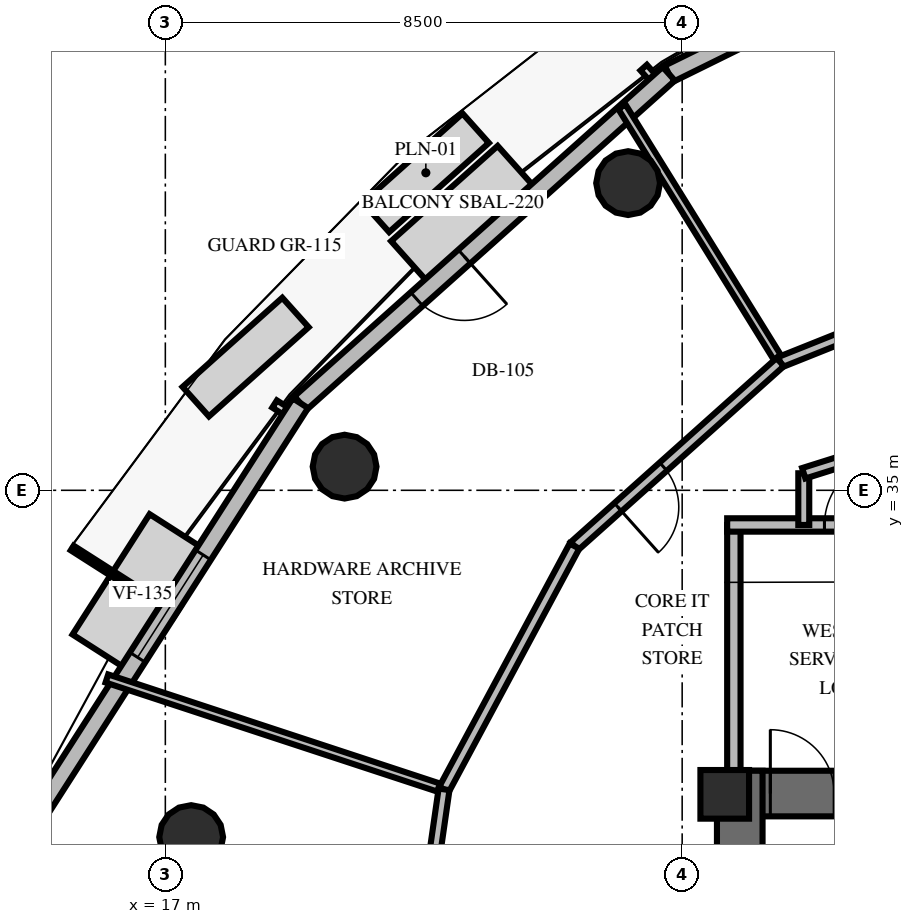
"""IFC4 building model, lengths in metres.
Left out: names, types, materials, properties, quantities, classifications, styles, units other than length and angle.
Written with IfcOpenShell. Run it as: python <this file> out.ifc"""

import sys

from ifc_helpers import new_model, si_unit, direction, frame, frame_2d, origin, origin_2d, place, context, subcontext, project, spatial, rectangle, circle, extrude, element, fill, save


model = new_model("IFC4")
c1 = context("Model", 3, precision=1e-05, world=origin(), true_north=direction((0.0, 1.0)))
c2 = subcontext(c1, "Body", "Model", "MODEL_VIEW")
j1 = project(units=[si_unit("LENGTHUNIT", "METRE"), si_unit("PLANEANGLEUNIT", "RADIAN")], contexts=[c1])
p1 = place(None, origin())
s1 = spatial("IfcSite", under=j1, at=p1, CompositionType="ELEMENT")
p2 = place(p1, origin())
s2 = spatial("IfcBuilding", under=s1, at=p2, CompositionType="ELEMENT")
p3 = place(p2, frame((0.0, 0.0, 206.0)))
s3 = spatial("IfcBuildingStorey", under=s2, at=p3, CompositionType="ELEMENT", Elevation=206.0)
p4 = place(p3, frame((26.072, 30.013, 0.0), z_axis=(0.0, 0.0, 1.0), x_axis=(1.0, 0.0, 0.0)))
e1 = element("IfcWall", 1, at=p4, inside=s3, PredefinedType="SHEAR", context=c2, shape_type="SweptSolid", body=[
    extrude(rectangle(XDim=15.866, YDim=0.75, at=frame_2d((7.933, 0.0))), origin(), (0.0, 0.0, 1.0), 3.6),
])
p5 = place(p4, frame((0.878, 0.0, 0.0)))
e2 = element("IfcOpeningElement", 2, at=p5, cuts=e1, PredefinedType="OPENING", context=c2, shape_type="SweptSolid", body=[
    extrude(rectangle(XDim=1.05, YDim=2.15, at=frame_2d((0.525, 1.075))), frame((0.0, 0.385, 0.0), z_axis=(0.0, -1.0, 0.0), x_axis=(1.0, 0.0, 0.0)), (0.0, 0.0, 1.0), 0.77),
])
p6 = place(p4, frame((13.928, 0.0, 0.0)))
e3 = element("IfcOpeningElement", 3, at=p6, cuts=e1, PredefinedType="OPENING", context=c2, shape_type="SweptSolid", body=[
    extrude(rectangle(XDim=1.05, YDim=2.15, at=frame_2d((0.525, 1.075))), frame((0.0, 0.385, 0.0), z_axis=(0.0, -1.0, 0.0), x_axis=(1.0, 0.0, 0.0)), (0.0, 0.0, 1.0), 0.77),
])
p7 = place(p4, frame((7.378, 0.0, 0.0)))
e4 = element("IfcOpeningElement", 4, at=p7, cuts=e1, PredefinedType="OPENING", context=c2, shape_type="SweptSolid", body=[
    extrude(rectangle(XDim=1.1, YDim=2.15, at=frame_2d((0.55, 1.075))), frame((0.0, 0.385, 0.0), z_axis=(0.0, -1.0, 0.0), x_axis=(1.0, 0.0, 0.0)), (0.0, 0.0, 1.0), 0.77),
])
p8 = place(p3, frame((26.447, 19.812, 0.0), z_axis=(0.0, 0.0, 1.0), x_axis=(0.0, 1.0, 0.0)))
e5 = element("IfcWall", 5, at=p8, inside=s3, PredefinedType="SHEAR", context=c2, shape_type="SweptSolid", body=[
    extrude(rectangle(XDim=10.576, YDim=0.75, at=frame_2d((5.288, 0.0))), origin(), (0.0, 0.0, 1.0), 3.6),
])
p9 = place(p3, frame((26.2, 30.0, 0.0), z_axis=(0.0, 0.0, 1.0), x_axis=(1.0, 0.0, 0.0)))
e6 = element("IfcColumn", 6, at=p9, inside=s3, PredefinedType="PILASTER", context=c2, shape_type="SweptSolid", body=[
    extrude(rectangle(XDim=0.8, YDim=0.8, at=origin_2d()), origin(), (0.0, 0.0, 1.0), 3.6),
])
for number, where, z_axis, x_axis in (
    (7, (24.611, 40.052, 0.0), (0.0, 0.0, 1.0), (1.0, 0.0, 0.0)),
    (8, (19.948, 35.389, 0.0), (0.0, 0.0, 1.0), (1.0, 0.0, 0.0)),
    (9, (17.425, 29.297, 0.0), (0.0, 0.0, 1.0), (1.0, 0.0, 0.0)),
):
    element("IfcColumn", number, at=place(p3, frame(where, z_axis=z_axis, x_axis=x_axis)), inside=s3, PredefinedType="COLUMN", context=c2, shape_type="SweptSolid", body=[
        extrude(circle(Radius=0.525, at=origin_2d()), origin(), (0.0, 0.0, 1.0), 3.6),
    ])
p10 = place(p3, frame((32.39, 45.355, 0.0), z_axis=(0.0, 0.0, 1.0), x_axis=(-0.896932281423, -0.442167934773, 0.0)))
e10 = element("IfcWall", 10, at=p10, inside=s3, PredefinedType="SOLIDWALL", context=c2, shape_type="SweptSolid", body=[
    extrude(rectangle(XDim=7.927, YDim=0.3, at=frame_2d((3.964, 0.0))), origin(), (0.0, 0.0, 1.0), 2.66),
])
p11 = place(p10, frame((2.964, 0.0, 0.8)))
e11 = element("IfcOpeningElement", 11, at=p11, cuts=e10, PredefinedType="OPENING", context=c2, shape_type="SweptSolid", body=[
    extrude(rectangle(XDim=2.0, YDim=1.85, at=frame_2d((1.0, 0.925))), frame((0.0, 0.16, 0.0), z_axis=(0.0, -1.0, 0.0), x_axis=(1.0, 0.0, 0.0)), (0.0, 0.0, 1.0), 0.32),
])
p12 = place(p3, frame((25.28, 41.85, 0.0), z_axis=(0.0, 0.0, 1.0), x_axis=(-0.745478547566, -0.666529620586, 0.0)))
e12 = element("IfcWall", 12, at=p12, inside=s3, PredefinedType="SOLIDWALL", context=c2, shape_type="SweptSolid", body=[
    extrude(rectangle(XDim=8.127, YDim=0.3, at=frame_2d((4.063, 0.0))), origin(), (0.0, 0.0, 1.0), 2.66),
])
p13 = place(p12, frame((4.51, 0.0, 0.0)))
e13 = element("IfcOpeningElement", 13, at=p13, cuts=e12, PredefinedType="OPENING", context=c2, shape_type="SweptSolid", body=[
    extrude(rectangle(XDim=1.05, YDim=2.15, at=frame_2d((0.525, 1.075))), frame((0.0, 0.16, 0.0), z_axis=(0.0, -1.0, 0.0), x_axis=(1.0, 0.0, 0.0)), (0.0, 0.0, 1.0), 0.32),
])
p14 = place(p3, frame((19.221, 36.433, 0.0), z_axis=(0.0, 0.0, 1.0), x_axis=(-0.539397988858, -0.842050954287, 0.0)))
e14 = element("IfcWall", 14, at=p14, inside=s3, PredefinedType="SOLIDWALL", context=c2, shape_type="SweptSolid", body=[
    extrude(rectangle(XDim=7.927, YDim=0.3, at=frame_2d((3.964, 0.0))), origin(), (0.0, 0.0, 1.0), 2.66),
])
p15 = place(p14, frame((2.964, 0.0, 0.8)))
e15 = element("IfcOpeningElement", 15, at=p15, cuts=e14, PredefinedType="OPENING", context=c2, shape_type="SweptSolid", body=[
    extrude(rectangle(XDim=2.0, YDim=1.85, at=frame_2d((1.0, 0.925))), frame((0.0, 0.16, 0.0), z_axis=(0.0, -1.0, 0.0), x_axis=(1.0, 0.0, 0.0)), (0.0, 0.0, 1.0), 0.32),
])
p16 = place(p3, frame((26.35, 30.05, 0.0), z_axis=(0.0, 0.0, 1.0), x_axis=(0.0, 1.0, 0.0)))
e16 = element("IfcWall", 16, at=p16, inside=s3, PredefinedType="SOLIDWALL", context=c2, shape_type="SweptSolid", body=[
    extrude(rectangle(XDim=4.38, YDim=0.22, at=frame_2d((2.19, 0.0))), origin(), (0.0, 0.0, 1.0), 2.46),
])
p17 = place(p3, frame((26.24, 34.43, 0.0), z_axis=(0.0, 0.0, 1.0), x_axis=(1.0, 0.0, 0.0)))
e17 = element("IfcWall", 17, at=p17, inside=s3, PredefinedType="SOLIDWALL", context=c2, shape_type="SweptSolid", body=[
    extrude(rectangle(XDim=4.31, YDim=0.22, at=frame_2d((2.155, 0.0))), origin(), (0.0, 0.0, 1.0), 2.46),
])
p18 = place(p17, frame((1.6, 0.0, 0.0)))
e18 = element("IfcOpeningElement", 18, at=p18, cuts=e17, PredefinedType="OPENING", context=c2, shape_type="SweptSolid", body=[
    extrude(rectangle(XDim=1.1, YDim=2.15, at=frame_2d((0.55, 1.075))), frame((0.0, 0.12, 0.0), z_axis=(0.0, -1.0, 0.0), x_axis=(1.0, 0.0, 0.0)), (0.0, 0.0, 1.0), 0.24),
])
p19 = place(p3, frame((27.5, 34.43, 0.0), z_axis=(0.0, 0.0, 1.0), x_axis=(0.0, 1.0, 0.0)))
e19 = element("IfcWall", 19, at=p19, inside=s3, PredefinedType="PARTITIONING", context=c2, shape_type="SweptSolid", body=[
    extrude(rectangle(XDim=0.85, YDim=0.18, at=frame_2d((0.425, 0.0))), origin(), (0.0, 0.0, 1.0), 2.46),
])
p20 = place(p3, frame((27.5, 35.28, 0.0), z_axis=(0.0, 0.0, 1.0), x_axis=(0.953691418528, 0.300786765376, 0.0)))
e20 = element("IfcWall", 20, at=p20, inside=s3, PredefinedType="PARTITIONING", context=c2, shape_type="SweptSolid", body=[
    extrude(rectangle(XDim=6.816, YDim=0.18, at=frame_2d((3.408, 0.0))), origin(), (0.0, 0.0, 1.0), 2.46),
])
p21 = place(p20, frame((2.858, 0.0, 0.0)))
e21 = element("IfcOpeningElement", 21, at=p21, cuts=e20, PredefinedType="OPENING", context=c2, shape_type="SweptSolid", body=[
    extrude(rectangle(XDim=1.1, YDim=2.15, at=frame_2d((0.55, 1.075))), frame((0.0, 0.1, 0.0), z_axis=(0.0, -1.0, 0.0), x_axis=(1.0, 0.0, 0.0)), (0.0, 0.0, 1.0), 0.2),
])
p22 = place(p3, frame((27.113, 37.108, 0.0), z_axis=(0.0, 0.0, 1.0), x_axis=(-0.52699889077, 0.849865971273, 0.0)))
e22 = element("IfcWall", 22, at=p22, inside=s3, PredefinedType="PARTITIONING", context=c2, shape_type="SweptSolid", body=[
    extrude(rectangle(XDim=4.943, YDim=0.14, at=frame_2d((2.472, 0.0))), origin(), (0.0, 0.0, 1.0), 2.46),
])
p23 = place(p3, frame((31.327, 38.794, 0.0), z_axis=(0.0, 0.0, 1.0), x_axis=(-0.928491528262, -0.371353580763, 0.0)))
e23 = element("IfcWall", 23, at=p23, inside=s3, PredefinedType="PARTITIONING", context=c2, shape_type="SweptSolid", body=[
    extrude(rectangle(XDim=4.539, YDim=0.18, at=frame_2d((2.27, 0.0))), origin(), (0.0, 0.0, 1.0), 2.46),
])
p24 = place(p23, frame((1.695, 0.0, 0.0)))
e24 = element("IfcOpeningElement", 24, at=p24, cuts=e23, PredefinedType="OPENING", context=c2, shape_type="SweptSolid", body=[
    extrude(rectangle(XDim=1.15, YDim=2.15, at=frame_2d((0.575, 1.075))), frame((0.0, 0.1, 0.0), z_axis=(0.0, -1.0, 0.0), x_axis=(1.0, 0.0, 0.0)), (0.0, 0.0, 1.0), 0.2),
])
p25 = place(p3, frame((21.584, 30.082, 0.0), z_axis=(0.0, 0.0, 1.0), x_axis=(-0.949971843281, 0.31233555189, 0.0)))
e25 = element("IfcWall", 25, at=p25, inside=s3, PredefinedType="PARTITIONING", context=c2, shape_type="SweptSolid", body=[
    extrude(rectangle(XDim=5.837, YDim=0.14, at=frame_2d((2.919, 0.0))), origin(), (0.0, 0.0, 1.0), 2.46),
])
p26 = place(p3, frame((27.113, 37.108, 0.0), z_axis=(0.0, 0.0, 1.0), x_axis=(-0.745456496411, -0.66655428283, 0.0)))
e26 = element("IfcWall", 26, at=p26, inside=s3, PredefinedType="PARTITIONING", context=c2, shape_type="SweptSolid", body=[
    extrude(rectangle(XDim=4.539, YDim=0.18, at=frame_2d((2.27, 0.0))), origin(), (0.0, 0.0, 1.0), 2.46),
])
p27 = place(p26, frame((2.579, 0.0, 0.0)))
e27 = element("IfcOpeningElement", 27, at=p27, cuts=e26, PredefinedType="OPENING", context=c2, shape_type="SweptSolid", body=[
    extrude(rectangle(XDim=1.0, YDim=2.15, at=frame_2d((0.5, 1.075))), frame((0.0, 0.1, 0.0), z_axis=(0.0, -1.0, 0.0), x_axis=(1.0, 0.0, 0.0)), (0.0, 0.0, 1.0), 0.2),
])
p28 = place(p3, frame((23.729, 34.083, 0.0), z_axis=(0.0, 0.0, 1.0), x_axis=(-0.472569149638, -0.881293593992, 0.0)))
e28 = element("IfcWall", 28, at=p28, inside=s3, PredefinedType="PARTITIONING", context=c2, shape_type="SweptSolid", body=[
    extrude(rectangle(XDim=4.539, YDim=0.18, at=frame_2d((2.27, 0.0))), origin(), (0.0, 0.0, 1.0), 2.46),
])
p29 = place(p3, frame((21.584, 30.082, 0.0), z_axis=(0.0, 0.0, 1.0), x_axis=(-0.142693812172, -0.989766879607, 0.0)))
e29 = element("IfcWall", 29, at=p29, inside=s3, PredefinedType="PARTITIONING", context=c2, shape_type="SweptSolid", body=[
    extrude(rectangle(XDim=4.539, YDim=0.18, at=frame_2d((2.27, 0.0))), origin(), (0.0, 0.0, 1.0), 2.46),
])
p30 = place(p29, frame((2.467, 0.0, 0.0)))
e30 = element("IfcOpeningElement", 30, at=p30, cuts=e29, PredefinedType="OPENING", context=c2, shape_type="SweptSolid", body=[
    extrude(rectangle(XDim=1.15, YDim=2.15, at=frame_2d((0.575, 1.075))), frame((0.0, 0.1, 0.0), z_axis=(0.0, -1.0, 0.0), x_axis=(1.0, 0.0, 0.0)), (0.0, 0.0, 1.0), 0.2),
])
p31 = place(p13, origin())
e31 = element("IfcDoor", 31, at=p31, inside=s3, OperationType="SINGLE_SWING_LEFT", PredefinedType="DOOR", context=c2, shape_type="SweptSolid", body=[
    extrude(rectangle(XDim=1.05, YDim=2.15, at=frame_2d((0.525, 1.075))), frame((0.0, 0.025, 0.0), z_axis=(0.0, -1.0, 0.0), x_axis=(1.0, 0.0, 0.0)), (0.0, 0.0, 1.0), 0.05),
])
fill(e13, e31)
p32 = place(p15, origin())
e32 = element("IfcWindow", 32, at=p32, inside=s3, PartitioningType="SINGLE_PANEL", PredefinedType="WINDOW", context=c2, shape_type="SweptSolid", body=[
    extrude(rectangle(XDim=2.0, YDim=1.85, at=frame_2d((1.0, 0.925))), frame((0.0, 0.03, 0.0), z_axis=(0.0, -1.0, 0.0), x_axis=(1.0, 0.0, 0.0)), (0.0, 0.0, 1.0), 0.06),
])
fill(e15, e32)
p33 = place(p5, origin())
e33 = element("IfcDoor", 33, at=p33, inside=s3, OperationType="SINGLE_SWING_LEFT", PredefinedType="DOOR", context=c2, shape_type="SweptSolid", body=[
    extrude(rectangle(XDim=1.05, YDim=2.15, at=frame_2d((0.525, 1.075))), frame((0.0, 0.025, 0.0), z_axis=(0.0, -1.0, 0.0), x_axis=(1.0, 0.0, 0.0)), (0.0, 0.0, 1.0), 0.05),
])
fill(e2, e33)
p34 = place(p18, origin())
e34 = element("IfcDoor", 34, at=p34, inside=s3, OperationType="SINGLE_SWING_RIGHT", PredefinedType="DOOR", context=c2, shape_type="SweptSolid", body=[
    extrude(rectangle(XDim=1.1, YDim=2.15, at=frame_2d((0.55, 1.075))), frame((0.0, 0.025, 0.0), z_axis=(0.0, -1.0, 0.0), x_axis=(1.0, 0.0, 0.0)), (0.0, 0.0, 1.0), 0.05),
])
fill(e18, e34)
p35 = place(p27, origin())
e35 = element("IfcDoor", 35, at=p35, inside=s3, OperationType="SINGLE_SWING_RIGHT", PredefinedType="DOOR", context=c2, shape_type="SweptSolid", body=[
    extrude(rectangle(XDim=1.0, YDim=2.15, at=frame_2d((0.5, 1.075))), frame((0.0, 0.025, 0.0), z_axis=(0.0, -1.0, 0.0), x_axis=(1.0, 0.0, 0.0)), (0.0, 0.0, 1.0), 0.05),
])
fill(e27, e35)
save(model, sys.argv[1])
